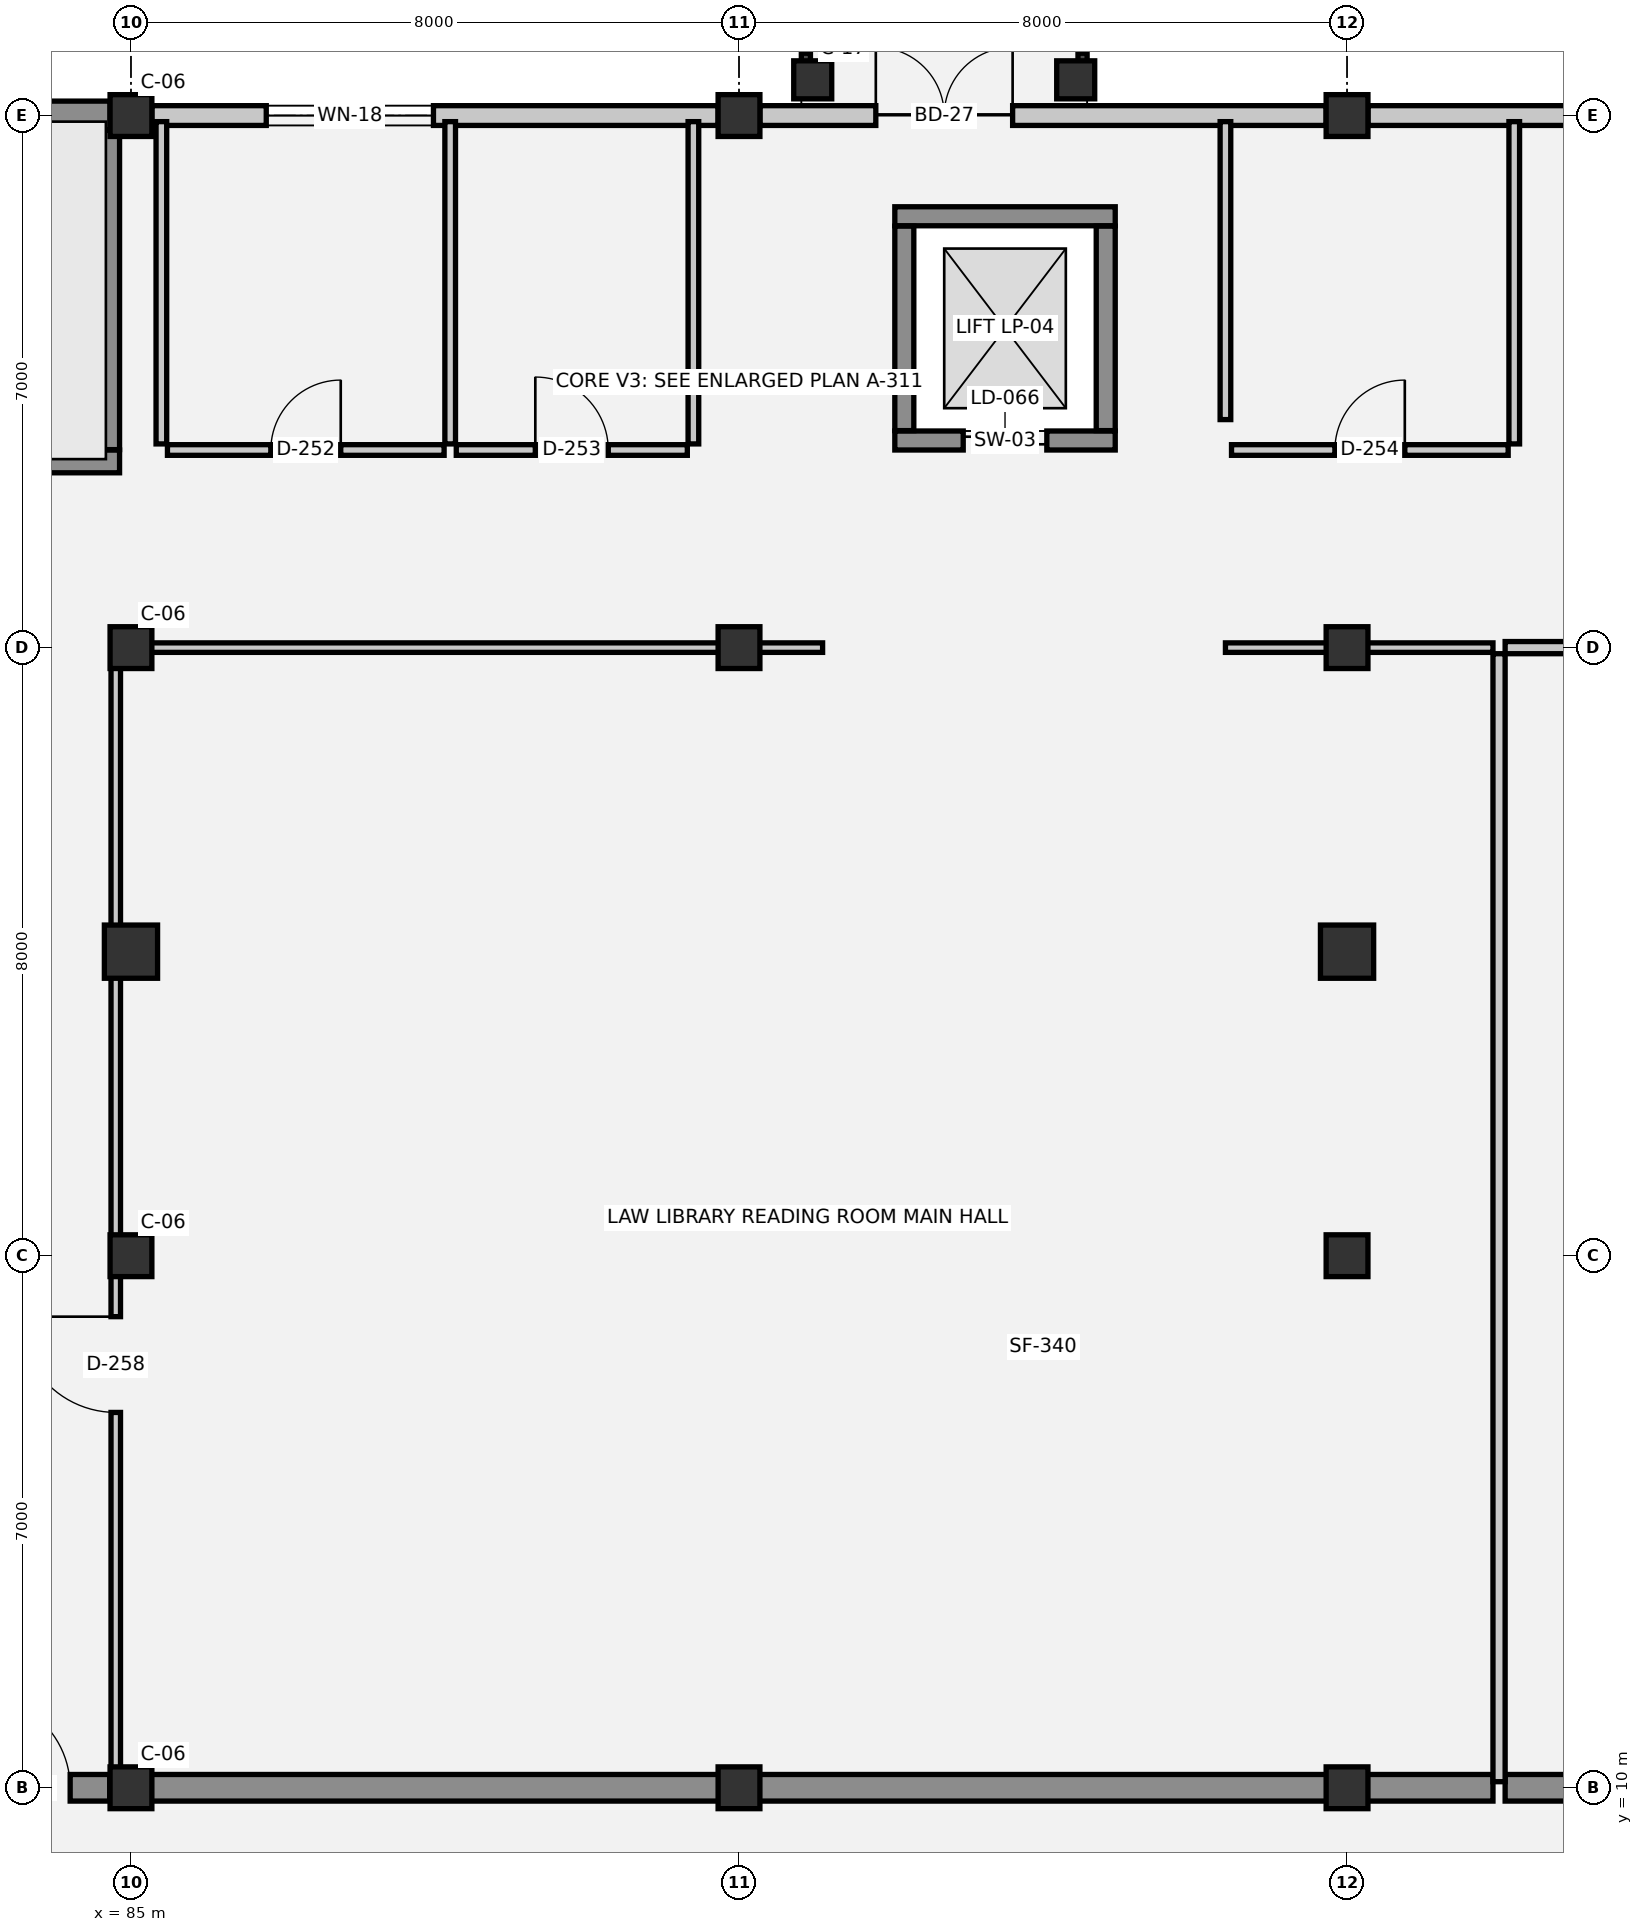
"""IFC4 building model, lengths in metres.
Left out: names, types, materials, properties, quantities, classifications, styles, units other than length and angle.
Written with IfcOpenShell. Run it as: python <this file> out.ifc"""

import sys

from ifc_helpers import new_model, si_unit, direction, frame, frame_2d, origin, origin_2d, place, context, subcontext, project, spatial, rectangle, circle, extrude, element, fill, save


model = new_model("IFC4")
c1 = context("Model", 3, precision=1e-05, world=origin(), true_north=direction((0.0, 1.0)))
c2 = subcontext(c1, "Body", "Model", "MODEL_VIEW")
j1 = project(units=[si_unit("LENGTHUNIT", "METRE"), si_unit("PLANEANGLEUNIT", "RADIAN")], contexts=[c1])
p1 = place(None, origin())
s1 = spatial("IfcSite", under=j1, at=p1, CompositionType="ELEMENT")
p2 = place(p1, origin())
s2 = spatial("IfcBuilding", under=s1, at=p2, CompositionType="ELEMENT")
p3 = place(p2, frame((0.0, 0.0, 18.3)))
s3 = spatial("IfcBuildingStorey", under=s2, at=p3, CompositionType="ELEMENT", Elevation=18.3)
for number, where, z_axis, x_axis in (
    (1, (85.0, 10.0, 0.0), (0.0, 0.0, 1.0), (1.0, 0.0, 0.0)),
    (2, (85.0, 17.0, 0.0), (0.0, 0.0, 1.0), (1.0, 0.0, 0.0)),
    (3, (85.0, 25.0, 0.0), (0.0, 0.0, 1.0), (1.0, 0.0, 0.0)),
    (4, (85.0, 32.0, 0.0), (0.0, 0.0, 1.0), (1.0, 0.0, 0.0)),
    (5, (93.0, 10.0, 0.0), (0.0, 0.0, 1.0), (1.0, 0.0, 0.0)),
    (6, (93.0, 25.0, 0.0), (0.0, 0.0, 1.0), (1.0, 0.0, 0.0)),
    (7, (93.0, 32.0, 0.0), (0.0, 0.0, 1.0), (1.0, 0.0, 0.0)),
    (8, (101.0, 10.0, 0.0), (0.0, 0.0, 1.0), (1.0, 0.0, 0.0)),
    (9, (101.0, 17.0, 0.0), (0.0, 0.0, 1.0), (1.0, 0.0, 0.0)),
    (10, (101.0, 25.0, 0.0), (0.0, 0.0, 1.0), (1.0, 0.0, 0.0)),
    (11, (101.0, 32.0, 0.0), (0.0, 0.0, 1.0), (1.0, 0.0, 0.0)),
):
    element("IfcColumn", number, at=place(p3, frame(where, z_axis=z_axis, x_axis=x_axis)), inside=s3, PredefinedType="COLUMN", context=c2, shape_type="SweptSolid", body=[
        extrude(rectangle(XDim=0.55, YDim=0.55, at=origin_2d()), origin(), (0.0, 0.0, 1.0), 3.75),
    ])
for number, where, z_axis, x_axis in (
    (12, (85.0, 21.0, 0.0), (0.0, 0.0, 1.0), (1.0, 0.0, 0.0)),
    (13, (101.0, 21.0, 0.0), (0.0, 0.0, 1.0), (1.0, 0.0, 0.0)),
):
    element("IfcColumn", number, at=place(p3, frame(where, z_axis=z_axis, x_axis=x_axis)), inside=s3, PredefinedType="COLUMN", context=c2, shape_type="SweptSolid", body=[
        extrude(circle(Radius=0.35, at=origin_2d()), origin(), (0.0, 0.0, 1.0), 3.75),
    ])
for number, where, z_axis, x_axis in (
    (14, (93.97, 32.47, 0.0), (0.0, 0.0, 1.0), (1.0, 0.0, 0.0)),
    (15, (97.43, 32.47, 0.0), (0.0, 0.0, 1.0), (1.0, 0.0, 0.0)),
):
    element("IfcColumn", number, at=place(p3, frame(where, z_axis=z_axis, x_axis=x_axis)), inside=s3, PredefinedType="COLUMN", context=c2, shape_type="SweptSolid", body=[
        extrude(rectangle(XDim=0.5, YDim=0.5, at=origin_2d()), origin(), (0.0, 0.0, 1.0), 3.52),
    ])
p4 = place(p3, frame((77.275, 32.0, 0.0), z_axis=(0.0, 0.0, 1.0), x_axis=(1.0, 0.0, 0.0)))
e16 = element("IfcWall", 16, at=p4, inside=s3, PredefinedType="STANDARD", context=c2, shape_type="SweptSolid", body=[
    extrude(rectangle(XDim=7.45, YDim=0.38, at=frame_2d((3.725, 0.0))), origin(), (0.0, 0.0, 1.0), 2.69),
])
p5 = place(p3, frame((85.275, 32.0, 0.0), z_axis=(0.0, 0.0, 1.0), x_axis=(1.0, 0.0, 0.0)))
e17 = element("IfcWall", 17, at=p5, inside=s3, PredefinedType="SOLIDWALL", context=c2, shape_type="SweptSolid", body=[
    extrude(rectangle(XDim=7.45, YDim=0.26, at=frame_2d((3.725, 0.0))), origin(), (0.0, 0.0, 1.0), 2.69),
])
p6 = place(p5, frame((1.505, 0.0, 0.9)))
e18 = element("IfcOpeningElement", 18, at=p6, cuts=e17, PredefinedType="OPENING", context=c2, shape_type="SweptSolid", body=[
    extrude(rectangle(XDim=2.2, YDim=1.0, at=frame_2d((1.1, 0.5))), frame((0.0, 0.14, 0.0), z_axis=(0.0, -1.0, 0.0), x_axis=(1.0, 0.0, 0.0)), (0.0, 0.0, 1.0), 0.28),
])
p7 = place(p3, frame((93.275, 32.0, 0.0), z_axis=(0.0, 0.0, 1.0), x_axis=(1.0, 0.0, 0.0)))
e19 = element("IfcWall", 19, at=p7, inside=s3, PredefinedType="SOLIDWALL", context=c2, shape_type="SweptSolid", body=[
    extrude(rectangle(XDim=7.45, YDim=0.26, at=frame_2d((3.725, 0.0))), origin(), (0.0, 0.0, 1.0), 2.69),
])
p8 = place(p7, frame((1.525, 0.0, 0.0)))
e20 = element("IfcOpeningElement", 20, at=p8, cuts=e19, PredefinedType="OPENING", context=c2, shape_type="SweptSolid", body=[
    extrude(rectangle(XDim=1.8, YDim=2.25, at=frame_2d((0.9, 1.125))), frame((0.0, 0.14, 0.0), z_axis=(0.0, -1.0, 0.0), x_axis=(1.0, 0.0, 0.0)), (0.0, 0.0, 1.0), 0.28),
])
p9 = place(p3, frame((101.275, 32.0, 0.0), z_axis=(0.0, 0.0, 1.0), x_axis=(1.0, 0.0, 0.0)))
e21 = element("IfcWall", 21, at=p9, inside=s3, PredefinedType="SOLIDWALL", context=c2, shape_type="SweptSolid", body=[
    extrude(rectangle(XDim=7.45, YDim=0.26, at=frame_2d((3.725, 0.0))), origin(), (0.0, 0.0, 1.0), 2.69),
])
p10 = place(p9, frame((2.625, 0.0, 0.9)))
e22 = element("IfcOpeningElement", 22, at=p10, cuts=e21, PredefinedType="OPENING", context=c2, shape_type="SweptSolid", body=[
    extrude(rectangle(XDim=2.2, YDim=1.0, at=frame_2d((1.1, 0.5))), frame((0.0, 0.14, 0.0), z_axis=(0.0, -1.0, 0.0), x_axis=(1.0, 0.0, 0.0)), (0.0, 0.0, 1.0), 0.28),
])
p11 = place(p3, frame((95.05, 27.725, 0.0), z_axis=(0.0, 0.0, 1.0), x_axis=(1.0, 0.0, 0.0)))
e23 = element("IfcWall", 23, at=p11, inside=s3, PredefinedType="SHEAR", context=c2, shape_type="SweptSolid", body=[
    extrude(rectangle(XDim=2.9, YDim=0.25, at=frame_2d((1.45, 0.0))), origin(), (0.0, 0.0, 1.0), 3.75),
])
p12 = place(p11, frame((0.9, 0.0, 0.0)))
e24 = element("IfcOpeningElement", 24, at=p12, cuts=e23, PredefinedType="OPENING", context=c2, shape_type="SweptSolid", body=[
    extrude(rectangle(XDim=1.1, YDim=2.15, at=frame_2d((0.55, 1.075))), frame((0.0, 0.135, 0.0), z_axis=(0.0, -1.0, 0.0), x_axis=(1.0, 0.0, 0.0)), (0.0, 0.0, 1.0), 0.27),
])
p13 = place(p3, frame((97.95, 30.675, 0.0), z_axis=(0.0, 0.0, 1.0), x_axis=(-1.0, 0.0, 0.0)))
e25 = element("IfcWall", 25, at=p13, inside=s3, PredefinedType="SHEAR", context=c2, shape_type="SweptSolid", body=[
    extrude(rectangle(XDim=2.9, YDim=0.25, at=frame_2d((1.45, 0.0))), origin(), (0.0, 0.0, 1.0), 3.75),
])
for number, where, z_axis, x_axis in (
    (26, (95.175, 30.545, 0.0), (0.0, 0.0, 1.0), (0.0, -1.0, 0.0)),
    (27, (97.825, 27.855, 0.0), (0.0, 0.0, 1.0), (0.0, 1.0, 0.0)),
):
    element("IfcWall", number, at=place(p3, frame(where, z_axis=z_axis, x_axis=x_axis)), inside=s3, PredefinedType="SHEAR", context=c2, shape_type="SweptSolid", body=[
        extrude(rectangle(XDim=2.69, YDim=0.25, at=frame_2d((1.345, 0.0))), origin(), (0.0, 0.0, 1.0), 3.75),
    ])
p14 = place(p3, frame((77.195, 27.45, 0.0), z_axis=(0.0, 0.0, 1.0), x_axis=(1.0, 0.0, 0.0)))
e28 = element("IfcWall", 28, at=p14, inside=s3, PredefinedType="SHEAR", context=c2, shape_type="SweptSolid", body=[
    extrude(rectangle(XDim=7.655, YDim=0.3, at=frame_2d((3.828, 0.0))), origin(), (0.0, 0.0, 1.0), 3.41),
])
p15 = place(p14, frame((0.38, 0.0, 0.0)))
e29 = element("IfcOpeningElement", 29, at=p15, cuts=e28, PredefinedType="OPENING", context=c2, shape_type="SweptSolid", body=[
    extrude(rectangle(XDim=1.25, YDim=2.15, at=frame_2d((0.625, 1.075))), frame((0.0, 0.16, 0.0), z_axis=(0.0, -1.0, 0.0), x_axis=(1.0, 0.0, 0.0)), (0.0, 0.0, 1.0), 0.32),
])
p16 = place(p3, frame((84.7, 27.605, 0.0), z_axis=(0.0, 0.0, 1.0), x_axis=(0.0, 1.0, 0.0)))
e30 = element("IfcWall", 30, at=p16, inside=s3, PredefinedType="SHEAR", context=c2, shape_type="SweptSolid", body=[
    extrude(rectangle(XDim=4.2, YDim=0.3, at=frame_2d((2.1, 0.0))), origin(), (0.0, 0.0, 1.0), 3.41),
])
p17 = place(p3, frame((82.48, 10.0, 0.0), z_axis=(0.0, 0.0, 1.0), x_axis=(1.0, 0.0, 0.0)))
e31 = element("IfcWall", 31, at=p17, inside=s3, PredefinedType="SHEAR", context=c2, shape_type="SweptSolid", body=[
    extrude(rectangle(XDim=2.24, YDim=0.35, at=frame_2d((1.12, 0.0))), origin(), (0.0, 0.0, 1.0), 3.39),
])
p18 = place(p17, frame((0.52, 0.0, 0.0)))
e32 = element("IfcOpeningElement", 32, at=p18, cuts=e31, PredefinedType="OPENING", context=c2, shape_type="SweptSolid", body=[
    extrude(rectangle(XDim=1.2, YDim=2.15, at=frame_2d((0.6, 1.075))), frame((0.0, 0.185, 0.0), z_axis=(0.0, -1.0, 0.0), x_axis=(1.0, 0.0, 0.0)), (0.0, 0.0, 1.0), 0.37),
])
p19 = place(p3, frame((84.88, 10.0, 0.0), z_axis=(0.0, 0.0, 1.0), x_axis=(1.0, 0.0, 0.0)))
e33 = element("IfcWall", 33, at=p19, inside=s3, PredefinedType="SHEAR", context=c2, shape_type="SweptSolid", body=[
    extrude(rectangle(XDim=18.04, YDim=0.35, at=frame_2d((9.02, 0.0))), origin(), (0.0, 0.0, 1.0), 3.39),
])
p20 = place(p3, frame((103.08, 10.0, 0.0), z_axis=(0.0, 0.0, 1.0), x_axis=(1.0, 0.0, 0.0)))
e34 = element("IfcWall", 34, at=p20, inside=s3, PredefinedType="SHEAR", context=c2, shape_type="SweptSolid", body=[
    extrude(rectangle(XDim=13.84, YDim=0.35, at=frame_2d((6.92, 0.0))), origin(), (0.0, 0.0, 1.0), 3.39),
])
p21 = place(p3, frame((84.88, 25.0, 0.0), z_axis=(0.0, 0.0, 1.0), x_axis=(1.0, 0.0, 0.0)))
e35 = element("IfcWall", 35, at=p21, inside=s3, PredefinedType="PARTITIONING", context=c2, shape_type="SweptSolid", body=[
    extrude(rectangle(XDim=9.22, YDim=0.125, at=frame_2d((4.61, 0.0))), origin(), (0.0, 0.0, 1.0), 2.81),
])
p22 = place(p3, frame((99.4, 25.0, 0.0), z_axis=(0.0, 0.0, 1.0), x_axis=(1.0, 0.0, 0.0)))
e36 = element("IfcWall", 36, at=p22, inside=s3, PredefinedType="PARTITIONING", context=c2, shape_type="SweptSolid", body=[
    extrude(rectangle(XDim=3.52, YDim=0.125, at=frame_2d((1.76, 0.0))), origin(), (0.0, 0.0, 1.0), 2.81),
])
p23 = place(p3, frame((103.08, 25.0, 0.0), z_axis=(0.0, 0.0, 1.0), x_axis=(1.0, 0.0, 0.0)))
e37 = element("IfcWall", 37, at=p23, inside=s3, PredefinedType="PARTITIONING", context=c2, shape_type="SweptSolid", body=[
    extrude(rectangle(XDim=13.84, YDim=0.16, at=frame_2d((6.92, 0.0))), origin(), (0.0, 0.0, 1.0), 2.81),
])
p24 = place(p23, frame((8.059, 0.0, 0.0)))
e38 = element("IfcOpeningElement", 38, at=p24, cuts=e37, PredefinedType="OPENING", context=c2, shape_type="SweptSolid", body=[
    extrude(rectangle(XDim=1.28, YDim=2.2, at=frame_2d((0.64, 1.1))), frame((0.0, 0.09, 0.0), z_axis=(0.0, -1.0, 0.0), x_axis=(1.0, 0.0, 0.0)), (0.0, 0.0, 1.0), 0.18),
])
p25 = place(p3, frame((85.48, 27.6, 0.0), z_axis=(0.0, 0.0, 1.0), x_axis=(1.0, 0.0, 0.0)))
e39 = element("IfcWall", 39, at=p25, inside=s3, PredefinedType="PLUMBINGWALL", context=c2, shape_type="SweptSolid", body=[
    extrude(rectangle(XDim=3.64, YDim=0.14, at=frame_2d((1.82, 0.0))), origin(), (0.0, 0.0, 1.0), 3.39),
])
p26 = place(p25, frame((1.36, 0.0, 0.0)))
e40 = element("IfcOpeningElement", 40, at=p26, cuts=e39, PredefinedType="OPENING", context=c2, shape_type="SweptSolid", body=[
    extrude(rectangle(XDim=0.92, YDim=2.1, at=frame_2d((0.46, 1.05))), frame((0.0, 0.08, 0.0), z_axis=(0.0, -1.0, 0.0), x_axis=(1.0, 0.0, 0.0)), (0.0, 0.0, 1.0), 0.16),
])
p27 = place(p3, frame((89.28, 27.6, 0.0), z_axis=(0.0, 0.0, 1.0), x_axis=(1.0, 0.0, 0.0)))
e41 = element("IfcWall", 41, at=p27, inside=s3, PredefinedType="PLUMBINGWALL", context=c2, shape_type="SweptSolid", body=[
    extrude(rectangle(XDim=3.04, YDim=0.14, at=frame_2d((1.52, 0.0))), origin(), (0.0, 0.0, 1.0), 3.39),
])
p28 = place(p27, frame((1.04, 0.0, 0.0)))
e42 = element("IfcOpeningElement", 42, at=p28, cuts=e41, PredefinedType="OPENING", context=c2, shape_type="SweptSolid", body=[
    extrude(rectangle(XDim=0.96, YDim=2.1, at=frame_2d((0.48, 1.05))), frame((0.0, 0.08, 0.0), z_axis=(0.0, -1.0, 0.0), x_axis=(1.0, 0.0, 0.0)), (0.0, 0.0, 1.0), 0.16),
])
p29 = place(p3, frame((99.48, 27.6, 0.0), z_axis=(0.0, 0.0, 1.0), x_axis=(1.0, 0.0, 0.0)))
e43 = element("IfcWall", 43, at=p29, inside=s3, PredefinedType="PLUMBINGWALL", context=c2, shape_type="SweptSolid", body=[
    extrude(rectangle(XDim=3.64, YDim=0.14, at=frame_2d((1.82, 0.0))), origin(), (0.0, 0.0, 1.0), 3.39),
])
p30 = place(p29, frame((1.36, 0.0, 0.0)))
e44 = element("IfcOpeningElement", 44, at=p30, cuts=e43, PredefinedType="OPENING", context=c2, shape_type="SweptSolid", body=[
    extrude(rectangle(XDim=0.92, YDim=2.1, at=frame_2d((0.46, 1.05))), frame((0.0, 0.08, 0.0), z_axis=(0.0, -1.0, 0.0), x_axis=(1.0, 0.0, 0.0)), (0.0, 0.0, 1.0), 0.16),
])
p31 = place(p3, frame((84.8, 10.08, 0.0), z_axis=(0.0, 0.0, 1.0), x_axis=(0.0, 1.0, 0.0)))
e45 = element("IfcWall", 45, at=p31, inside=s3, PredefinedType="PARTITIONING", context=c2, shape_type="SweptSolid", body=[
    extrude(rectangle(XDim=14.84, YDim=0.125, at=frame_2d((7.42, 0.0))), origin(), (0.0, 0.0, 1.0), 2.86),
])
p32 = place(p31, frame((4.858, 0.0, 0.0)))
e46 = element("IfcOpeningElement", 46, at=p32, cuts=e45, PredefinedType="OPENING", context=c2, shape_type="SweptSolid", body=[
    extrude(rectangle(XDim=1.26, YDim=2.2, at=frame_2d((0.63, 1.1))), frame((0.0, 0.073, 0.0), z_axis=(0.0, -1.0, 0.0), x_axis=(1.0, 0.0, 0.0)), (0.0, 0.0, 1.0), 0.145),
])
for number, where, z_axis, x_axis in (
    (47, (85.4, 27.68, 0.0), (0.0, 0.0, 1.0), (0.0, 1.0, 0.0)),
    (48, (89.2, 27.68, 0.0), (0.0, 0.0, 1.0), (0.0, 1.0, 0.0)),
    (49, (92.4, 27.68, 0.0), (0.0, 0.0, 1.0), (0.0, 1.0, 0.0)),
):
    element("IfcWall", number, at=place(p3, frame(where, z_axis=z_axis, x_axis=x_axis)), inside=s3, PredefinedType="PLUMBINGWALL", context=c2, shape_type="SweptSolid", body=[
        extrude(rectangle(XDim=4.24, YDim=0.14, at=frame_2d((2.12, 0.0))), origin(), (0.0, 0.0, 1.0), 3.39),
    ])
p33 = place(p3, frame((99.4, 28.0, 0.0), z_axis=(0.0, 0.0, 1.0), x_axis=(0.0, 1.0, 0.0)))
e50 = element("IfcWall", 50, at=p33, inside=s3, PredefinedType="PLUMBINGWALL", context=c2, shape_type="SweptSolid", body=[
    extrude(rectangle(XDim=3.92, YDim=0.14, at=frame_2d((1.96, 0.0))), origin(), (0.0, 0.0, 1.0), 3.39),
])
p34 = place(p3, frame((103.0, 10.08, 0.0), z_axis=(0.0, 0.0, 1.0), x_axis=(0.0, 1.0, 0.0)))
e51 = element("IfcWall", 51, at=p34, inside=s3, PredefinedType="PARTITIONING", context=c2, shape_type="SweptSolid", body=[
    extrude(rectangle(XDim=14.84, YDim=0.16, at=frame_2d((7.42, 0.0))), origin(), (0.0, 0.0, 1.0), 3.39),
])
p35 = place(p3, frame((103.2, 27.68, 0.0), z_axis=(0.0, 0.0, 1.0), x_axis=(0.0, 1.0, 0.0)))
e52 = element("IfcWall", 52, at=p35, inside=s3, PredefinedType="PLUMBINGWALL", context=c2, shape_type="SweptSolid", body=[
    extrude(rectangle(XDim=4.24, YDim=0.14, at=frame_2d((2.12, 0.0))), origin(), (0.0, 0.0, 1.0), 3.39),
])
p36 = place(p6, origin())
e53 = element("IfcWindow", 53, at=p36, inside=s3, PartitioningType="SINGLE_PANEL", PredefinedType="WINDOW", context=c2, shape_type="SweptSolid", body=[
    extrude(rectangle(XDim=2.2, YDim=1.0, at=frame_2d((1.1, 0.5))), frame((0.0, 0.03, 0.0), z_axis=(0.0, -1.0, 0.0), x_axis=(1.0, 0.0, 0.0)), (0.0, 0.0, 1.0), 0.06),
])
fill(e18, e53)
p37 = place(p8, origin())
e54 = element("IfcDoor", 54, at=p37, inside=s3, OperationType="DOUBLE_DOOR_SINGLE_SWING", PredefinedType="DOOR", context=c2, shape_type="SweptSolid", body=[
    extrude(rectangle(XDim=1.8, YDim=2.25, at=frame_2d((0.9, 1.125))), frame((0.0, 0.025, 0.0), z_axis=(0.0, -1.0, 0.0), x_axis=(1.0, 0.0, 0.0)), (0.0, 0.0, 1.0), 0.05),
])
fill(e20, e54)
p38 = place(p12, origin())
e55 = element("IfcDoor", 55, at=p38, inside=s3, OperationType="DOUBLE_DOOR_SLIDING", PredefinedType="DOOR", context=c2, shape_type="SweptSolid", body=[
    extrude(rectangle(XDim=1.1, YDim=2.15, at=frame_2d((0.55, 1.075))), frame((0.0, 0.025, 0.0), z_axis=(0.0, -1.0, 0.0), x_axis=(1.0, 0.0, 0.0)), (0.0, 0.0, 1.0), 0.05),
])
fill(e24, e55)
p39 = place(p26, origin())
e56 = element("IfcDoor", 56, at=p39, inside=s3, OperationType="SINGLE_SWING_RIGHT", PredefinedType="DOOR", context=c2, shape_type="SweptSolid", body=[
    extrude(rectangle(XDim=0.92, YDim=2.1, at=frame_2d((0.46, 1.05))), frame((0.0, 0.025, 0.0), z_axis=(0.0, -1.0, 0.0), x_axis=(1.0, 0.0, 0.0)), (0.0, 0.0, 1.0), 0.05),
])
fill(e40, e56)
p40 = place(p28, origin())
e57 = element("IfcDoor", 57, at=p40, inside=s3, OperationType="SINGLE_SWING_LEFT", PredefinedType="DOOR", context=c2, shape_type="SweptSolid", body=[
    extrude(rectangle(XDim=0.96, YDim=2.1, at=frame_2d((0.48, 1.05))), frame((0.0, 0.025, 0.0), z_axis=(0.0, -1.0, 0.0), x_axis=(1.0, 0.0, 0.0)), (0.0, 0.0, 1.0), 0.05),
])
fill(e42, e57)
p41 = place(p30, origin())
e58 = element("IfcDoor", 58, at=p41, inside=s3, OperationType="SINGLE_SWING_RIGHT", PredefinedType="DOOR", context=c2, shape_type="SweptSolid", body=[
    extrude(rectangle(XDim=0.92, YDim=2.1, at=frame_2d((0.46, 1.05))), frame((0.0, 0.025, 0.0), z_axis=(0.0, -1.0, 0.0), x_axis=(1.0, 0.0, 0.0)), (0.0, 0.0, 1.0), 0.05),
])
fill(e44, e58)
p42 = place(p18, origin())
e59 = element("IfcDoor", 59, at=p42, inside=s3, OperationType="SINGLE_SWING_LEFT", PredefinedType="DOOR", context=c2, shape_type="SweptSolid", body=[
    extrude(rectangle(XDim=1.2, YDim=2.15, at=frame_2d((0.6, 1.075))), frame((0.0, 0.025, 0.0), z_axis=(0.0, -1.0, 0.0), x_axis=(1.0, 0.0, 0.0)), (0.0, 0.0, 1.0), 0.05),
])
fill(e32, e59)
p43 = place(p32, origin())
e60 = element("IfcDoor", 60, at=p43, inside=s3, OperationType="SINGLE_SWING_RIGHT", PredefinedType="DOOR", context=c2, shape_type="SweptSolid", body=[
    extrude(rectangle(XDim=1.26, YDim=2.2, at=frame_2d((0.63, 1.1))), frame((0.0, 0.025, 0.0), z_axis=(0.0, -1.0, 0.0), x_axis=(1.0, 0.0, 0.0)), (0.0, 0.0, 1.0), 0.05),
])
fill(e46, e60)
save(model, sys.argv[1])
